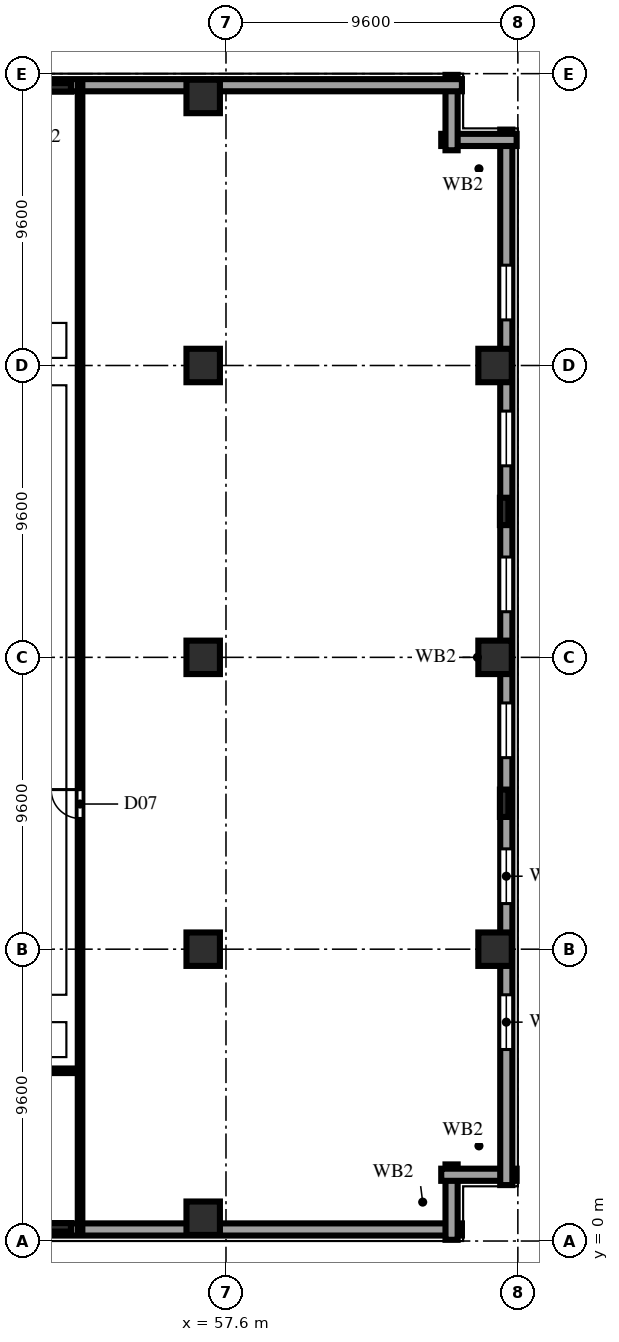
"""IFC4 building model, lengths in metres.
Left out: names, types, materials, properties, quantities, classifications, styles, units other than length and angle.
Written with IfcOpenShell. Run it as: python <this file> out.ifc"""

import sys

from ifc_helpers import new_model, si_unit, direction, frame, frame_2d, origin, origin_2d, place, context, subcontext, project, spatial, rectangle, extrude, element, fill, save


model = new_model("IFC4")
c1 = context("Model", 3, precision=1e-05, world=origin(), true_north=direction((0.0, 1.0)))
c2 = subcontext(c1, "Body", "Model", "MODEL_VIEW")
j1 = project(units=[si_unit("LENGTHUNIT", "METRE"), si_unit("PLANEANGLEUNIT", "RADIAN")], contexts=[c1])
p1 = place(None, origin())
s1 = spatial("IfcSite", under=j1, at=p1, CompositionType="ELEMENT")
p2 = place(p1, origin())
s2 = spatial("IfcBuilding", under=s1, at=p2, CompositionType="ELEMENT")
p3 = place(p2, frame((0.0, 0.0, 73.6)))
s3 = spatial("IfcBuildingStorey", under=s2, at=p3, CompositionType="ELEMENT", Elevation=73.6)
for number, where, z_axis, x_axis in (
    (1, (56.85, 0.75, 0.0), (0.0, 0.0, 1.0), (1.0, 0.0, 0.0)),
    (2, (56.85, 9.6, 0.0), (0.0, 0.0, 1.0), (1.0, 0.0, 0.0)),
    (3, (56.85, 19.2, 0.0), (0.0, 0.0, 1.0), (1.0, 0.0, 0.0)),
    (4, (56.85, 28.8, 0.0), (0.0, 0.0, 1.0), (1.0, 0.0, 0.0)),
    (5, (56.85, 37.65, 0.0), (0.0, 0.0, 1.0), (1.0, 0.0, 0.0)),
    (6, (66.45, 9.6, 0.0), (0.0, 0.0, 1.0), (1.0, 0.0, 0.0)),
    (7, (66.45, 19.2, 0.0), (0.0, 0.0, 1.0), (1.0, 0.0, 0.0)),
    (8, (66.45, 28.8, 0.0), (0.0, 0.0, 1.0), (1.0, 0.0, 0.0)),
):
    element("IfcColumn", number, at=place(p3, frame(where, z_axis=z_axis, x_axis=x_axis)), inside=s3, PredefinedType="COLUMN", context=c2, shape_type="SweptSolid", body=[
        extrude(rectangle(XDim=1.1, YDim=1.1, at=origin_2d()), origin(), (0.0, 0.0, 1.0), 3.8),
    ])
for number, where, z_axis, x_axis in (
    (9, (52.05, 0.45, 0.0), (0.0, 0.0, 1.0), (1.0, 0.0, 0.0)),
    (10, (66.75, 14.4, 0.0), (0.0, 0.0, 1.0), (0.0, 1.0, 0.0)),
    (11, (66.75, 24.0, 0.0), (0.0, 0.0, 1.0), (0.0, 1.0, 0.0)),
    (12, (52.05, 37.95, 0.0), (0.0, 0.0, 1.0), (1.0, 0.0, 0.0)),
):
    element("IfcColumn", number, at=place(p3, frame(where, z_axis=z_axis, x_axis=x_axis)), inside=s3, PredefinedType="PILASTER", context=c2, shape_type="SweptSolid", body=[
        extrude(rectangle(XDim=0.9, YDim=0.28, at=origin_2d()), origin(), (0.0, 0.0, 1.0), 3.8),
    ])
p4 = place(p3, frame((1.84, 0.38, 0.0), z_axis=(0.0, 0.0, 1.0), x_axis=(1.0, 0.0, 0.0)))
e13 = element("IfcWall", 13, at=p4, inside=s3, PredefinedType="SOLIDWALL", context=c2, shape_type="SweptSolid", body=[
    extrude(rectangle(XDim=63.52, YDim=0.4, at=frame_2d((31.76, 0.0))), origin(), (0.0, 0.0, 1.0), 3.54),
])
p5 = place(p4, frame((4.16, 0.0, 0.85)))
e14 = element("IfcOpeningElement", 14, at=p5, cuts=e13, PredefinedType="OPENING", context=c2, shape_type="SweptSolid", body=[
    extrude(rectangle(XDim=2.4, YDim=1.85, at=frame_2d((1.2, 0.925))), frame((0.0, 0.212, 0.0), z_axis=(0.0, -1.0, 0.0), x_axis=(1.0, 0.0, 0.0)), (0.0, 0.0, 1.0), 0.424),
])
p6 = place(p4, frame((8.96, 0.0, 0.85)))
e15 = element("IfcOpeningElement", 15, at=p6, cuts=e13, PredefinedType="OPENING", context=c2, shape_type="SweptSolid", body=[
    extrude(rectangle(XDim=2.4, YDim=1.85, at=frame_2d((1.2, 0.925))), frame((0.0, 0.212, 0.0), z_axis=(0.0, -1.0, 0.0), x_axis=(1.0, 0.0, 0.0)), (0.0, 0.0, 1.0), 0.424),
])
p7 = place(p4, frame((13.76, 0.0, 0.85)))
e16 = element("IfcOpeningElement", 16, at=p7, cuts=e13, PredefinedType="OPENING", context=c2, shape_type="SweptSolid", body=[
    extrude(rectangle(XDim=2.4, YDim=1.85, at=frame_2d((1.2, 0.925))), frame((0.0, 0.212, 0.0), z_axis=(0.0, -1.0, 0.0), x_axis=(1.0, 0.0, 0.0)), (0.0, 0.0, 1.0), 0.424),
])
p8 = place(p4, frame((18.56, 0.0, 0.85)))
e17 = element("IfcOpeningElement", 17, at=p8, cuts=e13, PredefinedType="OPENING", context=c2, shape_type="SweptSolid", body=[
    extrude(rectangle(XDim=2.4, YDim=1.85, at=frame_2d((1.2, 0.925))), frame((0.0, 0.212, 0.0), z_axis=(0.0, -1.0, 0.0), x_axis=(1.0, 0.0, 0.0)), (0.0, 0.0, 1.0), 0.424),
])
p9 = place(p4, frame((23.36, 0.0, 0.85)))
e18 = element("IfcOpeningElement", 18, at=p9, cuts=e13, PredefinedType="OPENING", context=c2, shape_type="SweptSolid", body=[
    extrude(rectangle(XDim=2.4, YDim=1.85, at=frame_2d((1.2, 0.925))), frame((0.0, 0.212, 0.0), z_axis=(0.0, -1.0, 0.0), x_axis=(1.0, 0.0, 0.0)), (0.0, 0.0, 1.0), 0.424),
])
p10 = place(p4, frame((28.16, 0.0, 0.85)))
e19 = element("IfcOpeningElement", 19, at=p10, cuts=e13, PredefinedType="OPENING", context=c2, shape_type="SweptSolid", body=[
    extrude(rectangle(XDim=2.4, YDim=1.85, at=frame_2d((1.2, 0.925))), frame((0.0, 0.212, 0.0), z_axis=(0.0, -1.0, 0.0), x_axis=(1.0, 0.0, 0.0)), (0.0, 0.0, 1.0), 0.424),
])
for number, where, z_axis, x_axis in (
    (20, (65.02, 0.04, 0.0), (0.0, 0.0, 1.0), (0.0, 1.0, 0.0)),
    (21, (64.68, 2.18, 0.0), (0.0, 0.0, 1.0), (1.0, 0.0, 0.0)),
):
    element("IfcWall", number, at=place(p3, frame(where, z_axis=z_axis, x_axis=x_axis)), inside=s3, PredefinedType="SOLIDWALL", context=c2, shape_type="SweptSolid", body=[
        extrude(rectangle(XDim=2.48, YDim=0.4, at=frame_2d((1.24, 0.0))), origin(), (0.0, 0.0, 1.0), 3.54),
    ])
p11 = place(p3, frame((66.82, 1.84, 0.0), z_axis=(0.0, 0.0, 1.0), x_axis=(0.0, 1.0, 0.0)))
e22 = element("IfcWall", 22, at=p11, inside=s3, PredefinedType="SOLIDWALL", context=c2, shape_type="SweptSolid", body=[
    extrude(rectangle(XDim=34.72, YDim=0.4, at=frame_2d((17.36, 0.0))), origin(), (0.0, 0.0, 1.0), 3.54),
])
p12 = place(p11, frame((4.46, 0.0, 0.85)))
e23 = element("IfcOpeningElement", 23, at=p12, cuts=e22, PredefinedType="OPENING", context=c2, shape_type="SweptSolid", body=[
    extrude(rectangle(XDim=1.8, YDim=1.85, at=frame_2d((0.9, 0.925))), frame((0.0, 0.212, 0.0), z_axis=(0.0, -1.0, 0.0), x_axis=(1.0, 0.0, 0.0)), (0.0, 0.0, 1.0), 0.424),
])
p13 = place(p11, frame((9.26, 0.0, 0.85)))
e24 = element("IfcOpeningElement", 24, at=p13, cuts=e22, PredefinedType="OPENING", context=c2, shape_type="SweptSolid", body=[
    extrude(rectangle(XDim=1.8, YDim=1.85, at=frame_2d((0.9, 0.925))), frame((0.0, 0.212, 0.0), z_axis=(0.0, -1.0, 0.0), x_axis=(1.0, 0.0, 0.0)), (0.0, 0.0, 1.0), 0.424),
])
p14 = place(p11, frame((14.06, 0.0, 0.85)))
e25 = element("IfcOpeningElement", 25, at=p14, cuts=e22, PredefinedType="OPENING", context=c2, shape_type="SweptSolid", body=[
    extrude(rectangle(XDim=1.8, YDim=1.85, at=frame_2d((0.9, 0.925))), frame((0.0, 0.212, 0.0), z_axis=(0.0, -1.0, 0.0), x_axis=(1.0, 0.0, 0.0)), (0.0, 0.0, 1.0), 0.424),
])
p15 = place(p11, frame((18.86, 0.0, 0.85)))
e26 = element("IfcOpeningElement", 26, at=p15, cuts=e22, PredefinedType="OPENING", context=c2, shape_type="SweptSolid", body=[
    extrude(rectangle(XDim=1.8, YDim=1.85, at=frame_2d((0.9, 0.925))), frame((0.0, 0.212, 0.0), z_axis=(0.0, -1.0, 0.0), x_axis=(1.0, 0.0, 0.0)), (0.0, 0.0, 1.0), 0.424),
])
p16 = place(p11, frame((23.66, 0.0, 0.85)))
e27 = element("IfcOpeningElement", 27, at=p16, cuts=e22, PredefinedType="OPENING", context=c2, shape_type="SweptSolid", body=[
    extrude(rectangle(XDim=1.8, YDim=1.85, at=frame_2d((0.9, 0.925))), frame((0.0, 0.212, 0.0), z_axis=(0.0, -1.0, 0.0), x_axis=(1.0, 0.0, 0.0)), (0.0, 0.0, 1.0), 0.424),
])
p17 = place(p11, frame((28.46, 0.0, 0.85)))
e28 = element("IfcOpeningElement", 28, at=p17, cuts=e22, PredefinedType="OPENING", context=c2, shape_type="SweptSolid", body=[
    extrude(rectangle(XDim=1.8, YDim=1.85, at=frame_2d((0.9, 0.925))), frame((0.0, 0.212, 0.0), z_axis=(0.0, -1.0, 0.0), x_axis=(1.0, 0.0, 0.0)), (0.0, 0.0, 1.0), 0.424),
])
p18 = place(p3, frame((67.16, 36.22, 0.0), z_axis=(0.0, 0.0, 1.0), x_axis=(-1.0, 0.0, 0.0)))
e29 = element("IfcWall", 29, at=p18, inside=s3, PredefinedType="SOLIDWALL", context=c2, shape_type="SweptSolid", body=[
    extrude(rectangle(XDim=2.48, YDim=0.4, at=frame_2d((1.24, 0.0))), origin(), (0.0, 0.0, 1.0), 3.54),
])
p19 = place(p3, frame((65.02, 35.88, 0.0), z_axis=(0.0, 0.0, 1.0), x_axis=(0.0, 1.0, 0.0)))
e30 = element("IfcWall", 30, at=p19, inside=s3, PredefinedType="SOLIDWALL", context=c2, shape_type="SweptSolid", body=[
    extrude(rectangle(XDim=2.48, YDim=0.4, at=frame_2d((1.24, 0.0))), origin(), (0.0, 0.0, 1.0), 3.54),
])
p20 = place(p3, frame((65.36, 38.02, 0.0), z_axis=(0.0, 0.0, 1.0), x_axis=(-1.0, 0.0, 0.0)))
e31 = element("IfcWall", 31, at=p20, inside=s3, PredefinedType="SOLIDWALL", context=c2, shape_type="SweptSolid", body=[
    extrude(rectangle(XDim=27.68, YDim=0.4, at=frame_2d((13.84, 0.0))), origin(), (0.0, 0.0, 1.0), 3.54),
])
p21 = place(p3, frame((0.22, 5.6, 0.0), z_axis=(0.0, 0.0, 1.0), x_axis=(1.0, 0.0, 0.0)))
e32 = element("IfcWall", 32, at=p21, inside=s3, PredefinedType="PARTITIONING", context=c2, shape_type="SweptSolid", body=[
    extrude(rectangle(XDim=52.58, YDim=0.15, at=frame_2d((26.29, 0.0))), origin(), (0.0, 0.0, 1.0), 3.54),
])
p22 = place(p21, frame((13.68, 0.0, 0.0)))
e33 = element("IfcOpeningElement", 33, at=p22, cuts=e32, PredefinedType="OPENING", context=c2, shape_type="SweptSolid", body=[
    extrude(rectangle(XDim=1.2, YDim=2.2, at=frame_2d((0.6, 1.1))), frame((0.0, 0.087, 0.0), z_axis=(0.0, -1.0, 0.0), x_axis=(1.0, 0.0, 0.0)), (0.0, 0.0, 1.0), 0.174),
])
p23 = place(p21, frame((32.33, 0.0, 0.0)))
e34 = element("IfcOpeningElement", 34, at=p23, cuts=e32, PredefinedType="OPENING", context=c2, shape_type="SweptSolid", body=[
    extrude(rectangle(XDim=1.2, YDim=2.2, at=frame_2d((0.6, 1.1))), frame((0.0, 0.087, 0.0), z_axis=(0.0, -1.0, 0.0), x_axis=(1.0, 0.0, 0.0)), (0.0, 0.0, 1.0), 0.174),
])
p24 = place(p21, frame((41.73, 0.0, 0.0)))
e35 = element("IfcOpeningElement", 35, at=p24, cuts=e32, PredefinedType="OPENING", context=c2, shape_type="SweptSolid", body=[
    extrude(rectangle(XDim=1.2, YDim=2.2, at=frame_2d((0.6, 1.1))), frame((0.0, 0.087, 0.0), z_axis=(0.0, -1.0, 0.0), x_axis=(1.0, 0.0, 0.0)), (0.0, 0.0, 1.0), 0.174),
])
p25 = place(p3, frame((52.8, 0.22, 0.0), z_axis=(0.0, 0.0, 1.0), x_axis=(0.0, 1.0, 0.0)))
e36 = element("IfcWall", 36, at=p25, inside=s3, PredefinedType="PARTITIONING", context=c2, shape_type="SweptSolid", body=[
    extrude(rectangle(XDim=37.96, YDim=0.15, at=frame_2d((18.98, 0.0))), origin(), (0.0, 0.0, 1.0), 3.54),
])
p26 = place(p25, frame((13.68, 0.0, 0.0)))
e37 = element("IfcOpeningElement", 37, at=p26, cuts=e36, PredefinedType="OPENING", context=c2, shape_type="SweptSolid", body=[
    extrude(rectangle(XDim=0.95, YDim=2.15, at=frame_2d((0.475, 1.075))), frame((0.0, 0.087, 0.0), z_axis=(0.0, -1.0, 0.0), x_axis=(1.0, 0.0, 0.0)), (0.0, 0.0, 1.0), 0.174),
])
p27 = place(p12, origin())
e38 = element("IfcWindow", 38, at=p27, inside=s3, PartitioningType="DOUBLE_PANEL_VERTICAL", PredefinedType="WINDOW", context=c2, shape_type="SweptSolid", body=[
    extrude(rectangle(XDim=1.8, YDim=1.85, at=frame_2d((0.9, 0.925))), frame((0.0, 0.11, 0.0), z_axis=(0.0, -1.0, 0.0), x_axis=(1.0, 0.0, 0.0)), (0.0, 0.0, 1.0), 0.06),
])
fill(e23, e38)
p28 = place(p13, origin())
e39 = element("IfcWindow", 39, at=p28, inside=s3, PartitioningType="DOUBLE_PANEL_VERTICAL", PredefinedType="WINDOW", context=c2, shape_type="SweptSolid", body=[
    extrude(rectangle(XDim=1.8, YDim=1.85, at=frame_2d((0.9, 0.925))), frame((0.0, 0.11, 0.0), z_axis=(0.0, -1.0, 0.0), x_axis=(1.0, 0.0, 0.0)), (0.0, 0.0, 1.0), 0.06),
])
fill(e24, e39)
p29 = place(p14, origin())
e40 = element("IfcWindow", 40, at=p29, inside=s3, PartitioningType="DOUBLE_PANEL_VERTICAL", PredefinedType="WINDOW", context=c2, shape_type="SweptSolid", body=[
    extrude(rectangle(XDim=1.8, YDim=1.85, at=frame_2d((0.9, 0.925))), frame((0.0, 0.11, 0.0), z_axis=(0.0, -1.0, 0.0), x_axis=(1.0, 0.0, 0.0)), (0.0, 0.0, 1.0), 0.06),
])
fill(e25, e40)
p30 = place(p15, origin())
e41 = element("IfcWindow", 41, at=p30, inside=s3, PartitioningType="DOUBLE_PANEL_VERTICAL", PredefinedType="WINDOW", context=c2, shape_type="SweptSolid", body=[
    extrude(rectangle(XDim=1.8, YDim=1.85, at=frame_2d((0.9, 0.925))), frame((0.0, 0.11, 0.0), z_axis=(0.0, -1.0, 0.0), x_axis=(1.0, 0.0, 0.0)), (0.0, 0.0, 1.0), 0.06),
])
fill(e26, e41)
p31 = place(p16, origin())
e42 = element("IfcWindow", 42, at=p31, inside=s3, PartitioningType="DOUBLE_PANEL_VERTICAL", PredefinedType="WINDOW", context=c2, shape_type="SweptSolid", body=[
    extrude(rectangle(XDim=1.8, YDim=1.85, at=frame_2d((0.9, 0.925))), frame((0.0, 0.11, 0.0), z_axis=(0.0, -1.0, 0.0), x_axis=(1.0, 0.0, 0.0)), (0.0, 0.0, 1.0), 0.06),
])
fill(e27, e42)
p32 = place(p17, origin())
e43 = element("IfcWindow", 43, at=p32, inside=s3, PartitioningType="DOUBLE_PANEL_VERTICAL", PredefinedType="WINDOW", context=c2, shape_type="SweptSolid", body=[
    extrude(rectangle(XDim=1.8, YDim=1.85, at=frame_2d((0.9, 0.925))), frame((0.0, 0.11, 0.0), z_axis=(0.0, -1.0, 0.0), x_axis=(1.0, 0.0, 0.0)), (0.0, 0.0, 1.0), 0.06),
])
fill(e28, e43)
p33 = place(p26, origin())
e44 = element("IfcDoor", 44, at=p33, inside=s3, OperationType="SINGLE_SWING_RIGHT", PredefinedType="DOOR", context=c2, shape_type="SweptSolid", body=[
    extrude(rectangle(XDim=0.95, YDim=2.15, at=frame_2d((0.475, 1.075))), frame((0.0, 0.025, 0.0), z_axis=(0.0, -1.0, 0.0), x_axis=(1.0, 0.0, 0.0)), (0.0, 0.0, 1.0), 0.05),
])
fill(e37, e44)
save(model, sys.argv[1])
